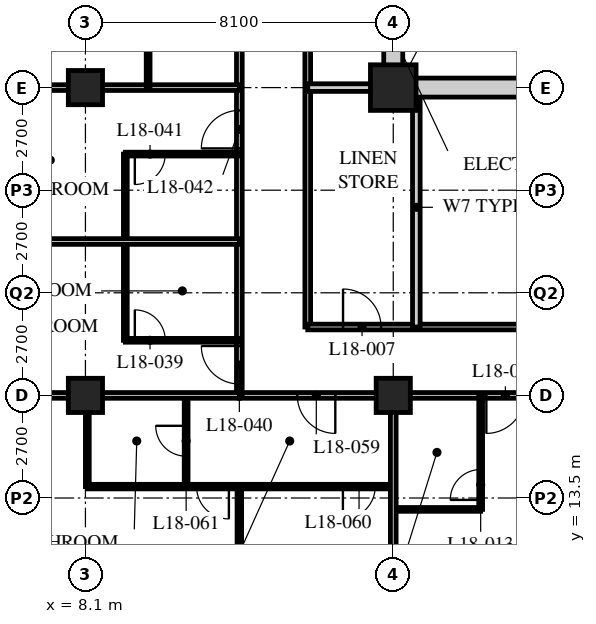
"""IFC4 building model, lengths in metres.
Left out: names, types, materials, properties, quantities, classifications, styles, units other than length and angle.
Written with IfcOpenShell. Run it as: python <this file> out.ifc"""

import sys

from ifc_helpers import new_model, si_unit, direction, frame, frame_2d, origin, origin_2d, place, context, subcontext, project, spatial, rectangle, hollow_rectangle, extrude, element, fill, save


model = new_model("IFC4")
c1 = context("Model", 3, precision=1e-05, world=origin(), true_north=direction((0.0, 1.0)))
c2 = subcontext(c1, "Body", "Model", "MODEL_VIEW")
j1 = project(units=[si_unit("LENGTHUNIT", "METRE"), si_unit("PLANEANGLEUNIT", "RADIAN")], contexts=[c1])
p1 = place(None, origin())
s1 = spatial("IfcSite", under=j1, at=p1, CompositionType="ELEMENT")
p2 = place(p1, origin())
s2 = spatial("IfcBuilding", under=s1, at=p2, CompositionType="ELEMENT")
p3 = place(p2, frame((0.0, 0.0, 73.8)))
s3 = spatial("IfcBuildingStorey", under=s2, at=p3, CompositionType="ELEMENT", Elevation=73.8)
for number, where, z_axis, x_axis in (
    (1, (8.1, 16.2, 0.0), (0.0, 0.0, 1.0), (1.0, 0.0, 0.0)),
    (2, (8.1, 24.3, 0.0), (0.0, 0.0, 1.0), (1.0, 0.0, 0.0)),
    (3, (16.2, 16.2, 0.0), (0.0, 0.0, 1.0), (1.0, 0.0, 0.0)),
):
    element("IfcColumn", number, at=place(p3, frame(where, z_axis=z_axis, x_axis=x_axis)), inside=s3, PredefinedType="COLUMN", context=c2, shape_type="SweptSolid", body=[
        extrude(hollow_rectangle(XDim=0.9, YDim=0.9, WallThickness=0.09, at=origin_2d()), origin(), (0.0, 0.0, 1.0), 3.4),
    ])
p4 = place(p3, frame((16.2, 24.3, 0.0), z_axis=(0.0, 0.0, 1.0), x_axis=(1.0, 0.0, 0.0)))
e4 = element("IfcColumn", 4, at=p4, inside=s3, PredefinedType="COLUMN", context=c2, shape_type="SweptSolid", body=[
    extrude(hollow_rectangle(XDim=1.2, YDim=1.2, WallThickness=0.12, at=origin_2d()), origin(), (0.0, 0.0, 1.0), 3.4),
])
p5 = place(p3, frame((12.15, 16.2, 0.0), z_axis=(0.0, 0.0, 1.0), x_axis=(1.0, 0.0, 0.0)))
e5 = element("IfcWall", 5, at=p5, inside=s3, PredefinedType="PARTITIONING", context=c2, shape_type="SweptSolid", body=[
    extrude(rectangle(XDim=36.45, YDim=0.15, at=frame_2d((18.225, 0.0))), origin(), (0.0, 0.0, 1.0), 2.578),
])
p6 = place(p5, frame((6.5, 0.0, 0.0)))
e6 = element("IfcOpeningElement", 6, at=p6, cuts=e5, PredefinedType="OPENING", context=c2, shape_type="SweptSolid", body=[
    extrude(rectangle(XDim=1.0, YDim=2.1, at=frame_2d((0.5, 1.05))), frame((0.0, 0.085, 0.0), z_axis=(0.0, -1.0, 0.0), x_axis=(1.0, 0.0, 0.0)), (0.0, 0.0, 1.0), 0.17),
])
p7 = place(p5, frame((8.4, 0.0, 0.0)))
e7 = element("IfcOpeningElement", 7, at=p7, cuts=e5, PredefinedType="OPENING", context=c2, shape_type="SweptSolid", body=[
    extrude(rectangle(XDim=1.0, YDim=2.1, at=frame_2d((0.5, 1.05))), frame((0.0, 0.085, 0.0), z_axis=(0.0, -1.0, 0.0), x_axis=(1.0, 0.0, 0.0)), (0.0, 0.0, 1.0), 0.17),
])
p8 = place(p5, frame((14.9, 0.0, 0.0)))
e8 = element("IfcOpeningElement", 8, at=p8, cuts=e5, PredefinedType="OPENING", context=c2, shape_type="SweptSolid", body=[
    extrude(rectangle(XDim=1.0, YDim=2.1, at=frame_2d((0.5, 1.05))), frame((0.0, 0.085, 0.0), z_axis=(0.0, -1.0, 0.0), x_axis=(1.0, 0.0, 0.0)), (0.0, 0.0, 1.0), 0.17),
])
p9 = place(p5, frame((16.5, 0.0, 0.0)))
e9 = element("IfcOpeningElement", 9, at=p9, cuts=e5, PredefinedType="OPENING", context=c2, shape_type="SweptSolid", body=[
    extrude(rectangle(XDim=1.0, YDim=2.1, at=frame_2d((0.5, 1.05))), frame((0.0, 0.085, 0.0), z_axis=(0.0, -1.0, 0.0), x_axis=(1.0, 0.0, 0.0)), (0.0, 0.0, 1.0), 0.17),
])
p10 = place(p5, frame((22.7, 0.0, 0.0)))
e10 = element("IfcOpeningElement", 10, at=p10, cuts=e5, PredefinedType="OPENING", context=c2, shape_type="SweptSolid", body=[
    extrude(rectangle(XDim=1.0, YDim=2.1, at=frame_2d((0.5, 1.05))), frame((0.0, 0.085, 0.0), z_axis=(0.0, -1.0, 0.0), x_axis=(1.0, 0.0, 0.0)), (0.0, 0.0, 1.0), 0.17),
])
p11 = place(p5, frame((24.9, 0.0, 0.0)))
e11 = element("IfcOpeningElement", 11, at=p11, cuts=e5, PredefinedType="OPENING", context=c2, shape_type="SweptSolid", body=[
    extrude(rectangle(XDim=1.0, YDim=2.1, at=frame_2d((0.5, 1.05))), frame((0.0, 0.085, 0.0), z_axis=(0.0, -1.0, 0.0), x_axis=(1.0, 0.0, 0.0)), (0.0, 0.0, 1.0), 0.17),
])
p12 = place(p5, frame((30.8, 0.0, 0.0)))
e12 = element("IfcOpeningElement", 12, at=p12, cuts=e5, PredefinedType="OPENING", context=c2, shape_type="SweptSolid", body=[
    extrude(rectangle(XDim=1.0, YDim=2.1, at=frame_2d((0.5, 1.05))), frame((0.0, 0.085, 0.0), z_axis=(0.0, -1.0, 0.0), x_axis=(1.0, 0.0, 0.0)), (0.0, 0.0, 1.0), 0.17),
])
p13 = place(p5, frame((1.525, 0.0, 0.0)))
e13 = element("IfcOpeningElement", 13, at=p13, cuts=e5, PredefinedType="OPENING", context=c2, shape_type="SweptSolid", body=[
    extrude(rectangle(XDim=1.0, YDim=2.1, at=frame_2d((0.5, 1.05))), frame((0.0, 0.085, 0.0), z_axis=(0.0, -1.0, 0.0), x_axis=(1.0, 0.0, 0.0)), (0.0, 0.0, 1.0), 0.17),
])
p14 = place(p5, frame((33.925, 0.0, 0.0)))
e14 = element("IfcOpeningElement", 14, at=p14, cuts=e5, PredefinedType="OPENING", context=c2, shape_type="SweptSolid", body=[
    extrude(rectangle(XDim=1.0, YDim=2.1, at=frame_2d((0.5, 1.05))), frame((0.0, 0.085, 0.0), z_axis=(0.0, -1.0, 0.0), x_axis=(1.0, 0.0, 0.0)), (0.0, 0.0, 1.0), 0.17),
])
p15 = place(p3, frame((12.15, 16.2, 0.0), z_axis=(0.0, 0.0, 1.0), x_axis=(0.0, 1.0, 0.0)))
e15 = element("IfcWall", 15, at=p15, inside=s3, PredefinedType="PARTITIONING", context=c2, shape_type="SweptSolid", body=[
    extrude(rectangle(XDim=26.1, YDim=0.15, at=frame_2d((13.05, 0.0))), origin(), (0.0, 0.0, 1.0), 3.19),
])
p16 = place(p15, frame((0.3, 0.0, 0.0)))
e16 = element("IfcOpeningElement", 16, at=p16, cuts=e15, PredefinedType="OPENING", context=c2, shape_type="SweptSolid", body=[
    extrude(rectangle(XDim=1.0, YDim=2.1, at=frame_2d((0.5, 1.05))), frame((0.0, 0.085, 0.0), z_axis=(0.0, -1.0, 0.0), x_axis=(1.0, 0.0, 0.0)), (0.0, 0.0, 1.0), 0.17),
])
p17 = place(p15, frame((6.5, 0.0, 0.0)))
e17 = element("IfcOpeningElement", 17, at=p17, cuts=e15, PredefinedType="OPENING", context=c2, shape_type="SweptSolid", body=[
    extrude(rectangle(XDim=1.0, YDim=2.1, at=frame_2d((0.5, 1.05))), frame((0.0, 0.085, 0.0), z_axis=(0.0, -1.0, 0.0), x_axis=(1.0, 0.0, 0.0)), (0.0, 0.0, 1.0), 0.17),
])
p18 = place(p15, frame((13.55, 0.0, 0.0)))
e18 = element("IfcOpeningElement", 18, at=p18, cuts=e15, PredefinedType="OPENING", context=c2, shape_type="SweptSolid", body=[
    extrude(rectangle(XDim=1.0, YDim=2.1, at=frame_2d((0.5, 1.05))), frame((0.0, 0.085, 0.0), z_axis=(0.0, -1.0, 0.0), x_axis=(1.0, 0.0, 0.0)), (0.0, 0.0, 1.0), 0.17),
])
p19 = place(p15, frame((21.65, 0.0, 0.0)))
e19 = element("IfcOpeningElement", 19, at=p19, cuts=e15, PredefinedType="OPENING", context=c2, shape_type="SweptSolid", body=[
    extrude(rectangle(XDim=1.0, YDim=2.1, at=frame_2d((0.5, 1.05))), frame((0.0, 0.085, 0.0), z_axis=(0.0, -1.0, 0.0), x_axis=(1.0, 0.0, 0.0)), (0.0, 0.0, 1.0), 0.17),
])
p20 = place(p3, frame((13.95, 40.5, 0.0), z_axis=(0.0, 0.0, 1.0), x_axis=(0.0, -1.0, 0.0)))
e20 = element("IfcWall", 20, at=p20, inside=s3, PredefinedType="PARTITIONING", context=c2, shape_type="SweptSolid", body=[
    extrude(rectangle(XDim=22.5, YDim=0.15, at=frame_2d((11.25, 0.0))), origin(), (0.0, 0.0, 1.0), 3.19),
])
p21 = place(p20, frame((11.65, 0.0, 0.0)))
e21 = element("IfcOpeningElement", 21, at=p21, cuts=e20, PredefinedType="OPENING", context=c2, shape_type="SweptSolid", body=[
    extrude(rectangle(XDim=1.0, YDim=2.1, at=frame_2d((0.5, 1.05))), frame((0.0, 0.085, 0.0), z_axis=(0.0, -1.0, 0.0), x_axis=(1.0, 0.0, 0.0)), (0.0, 0.0, 1.0), 0.17),
])
p22 = place(p20, frame((3.55, 0.0, 0.0)))
e22 = element("IfcOpeningElement", 22, at=p22, cuts=e20, PredefinedType="OPENING", context=c2, shape_type="SweptSolid", body=[
    extrude(rectangle(XDim=1.0, YDim=2.1, at=frame_2d((0.5, 1.05))), frame((0.0, 0.085, 0.0), z_axis=(0.0, -1.0, 0.0), x_axis=(1.0, 0.0, 0.0)), (0.0, 0.0, 1.0), 0.17),
])
p23 = place(p3, frame((13.95, 18.0, 0.0), z_axis=(0.0, 0.0, 1.0), x_axis=(1.0, 0.0, 0.0)))
e23 = element("IfcWall", 23, at=p23, inside=s3, PredefinedType="PARTITIONING", context=c2, shape_type="SweptSolid", body=[
    extrude(rectangle(XDim=13.19, YDim=0.15, at=frame_2d((6.595, 0.0))), origin(), (0.0, 0.0, 1.0), 3.19),
])
p24 = place(p23, frame((0.929, 0.0, 0.0)))
e24 = element("IfcOpeningElement", 24, at=p24, cuts=e23, PredefinedType="OPENING", context=c2, shape_type="SweptSolid", body=[
    extrude(rectangle(XDim=1.0, YDim=2.1, at=frame_2d((0.5, 1.05))), frame((0.0, 0.085, 0.0), z_axis=(0.0, -1.0, 0.0), x_axis=(1.0, 0.0, 0.0)), (0.0, 0.0, 1.0), 0.17),
])
p25 = place(p23, frame((7.529, 0.0, 0.0)))
e25 = element("IfcOpeningElement", 25, at=p25, cuts=e23, PredefinedType="OPENING", context=c2, shape_type="SweptSolid", body=[
    extrude(rectangle(XDim=1.0, YDim=2.1, at=frame_2d((0.5, 1.05))), frame((0.0, 0.085, 0.0), z_axis=(0.0, -1.0, 0.0), x_axis=(1.0, 0.0, 0.0)), (0.0, 0.0, 1.0), 0.17),
])
p26 = place(p3, frame((16.807, 18.0, 0.0), z_axis=(0.0, 0.0, 1.0), x_axis=(0.0, 1.0, 0.0)))
e26 = element("IfcWall", 26, at=p26, inside=s3, PredefinedType="SOLIDWALL", context=c2, shape_type="SweptSolid", body=[
    extrude(rectangle(XDim=6.3, YDim=0.2, at=frame_2d((3.15, 0.0))), origin(), (0.0, 0.0, 1.0), 3.19),
])
p27 = place(p3, frame((13.95, 24.3, 0.0), z_axis=(0.0, 0.0, 1.0), x_axis=(1.0, 0.0, 0.0)))
e27 = element("IfcWall", 27, at=p27, inside=s3, PredefinedType="SOLIDWALL", context=c2, shape_type="SweptSolid", body=[
    extrude(rectangle(XDim=2.25, YDim=0.2, at=frame_2d((1.125, 0.0))), origin(), (0.0, 0.0, 1.0), 2.578),
])
p28 = place(p3, frame((16.2, 13.2, 0.0), z_axis=(0.0, 0.0, 1.0), x_axis=(1.0, 0.0, 0.0)))
e28 = element("IfcWall", 28, at=p28, inside=s3, PredefinedType="PARTITIONING", context=c2, shape_type="SweptSolid", body=[
    extrude(rectangle(XDim=2.3, YDim=0.1, at=frame_2d((1.15, 0.0))), origin(), (0.0, 0.0, 1.0), 3.19),
])
p29 = place(p3, frame((18.5, 16.2, 0.0), z_axis=(0.0, 0.0, 1.0), x_axis=(0.0, -1.0, 0.0)))
e29 = element("IfcWall", 29, at=p29, inside=s3, PredefinedType="PARTITIONING", context=c2, shape_type="SweptSolid", body=[
    extrude(rectangle(XDim=3.0, YDim=0.1, at=frame_2d((1.5, 0.0))), origin(), (0.0, 0.0, 1.0), 3.19),
])
p30 = place(p29, frame((1.95, 0.0, 0.0)))
e30 = element("IfcOpeningElement", 30, at=p30, cuts=e29, PredefinedType="OPENING", context=c2, shape_type="SweptSolid", body=[
    extrude(rectangle(XDim=0.8, YDim=2.1, at=frame_2d((0.4, 1.05))), frame((0.0, 0.06, 0.0), z_axis=(0.0, -1.0, 0.0), x_axis=(1.0, 0.0, 0.0)), (0.0, 0.0, 1.0), 0.12),
])
p31 = place(p3, frame((9.15, 17.65, 0.0), z_axis=(0.0, 0.0, 1.0), x_axis=(0.0, 1.0, 0.0)))
e31 = element("IfcWall", 31, at=p31, inside=s3, PredefinedType="PARTITIONING", context=c2, shape_type="SweptSolid", body=[
    extrude(rectangle(XDim=4.9, YDim=0.1, at=frame_2d((2.45, 0.0))), origin(), (0.0, 0.0, 1.0), 3.19),
])
p32 = place(p3, frame((12.15, 17.65, 0.0), z_axis=(0.0, 0.0, 1.0), x_axis=(-1.0, 0.0, 0.0)))
e32 = element("IfcWall", 32, at=p32, inside=s3, PredefinedType="PARTITIONING", context=c2, shape_type="SweptSolid", body=[
    extrude(rectangle(XDim=3.0, YDim=0.1, at=frame_2d((1.5, 0.0))), origin(), (0.0, 0.0, 1.0), 3.19),
])
p33 = place(p32, frame((1.95, 0.0, 0.0)))
e33 = element("IfcOpeningElement", 33, at=p33, cuts=e32, PredefinedType="OPENING", context=c2, shape_type="SweptSolid", body=[
    extrude(rectangle(XDim=0.8, YDim=2.1, at=frame_2d((0.4, 1.05))), frame((0.0, 0.06, 0.0), z_axis=(0.0, -1.0, 0.0), x_axis=(1.0, 0.0, 0.0)), (0.0, 0.0, 1.0), 0.12),
])
p34 = place(p3, frame((12.15, 20.25, 0.0), z_axis=(0.0, 0.0, 1.0), x_axis=(-1.0, 0.0, 0.0)))
e34 = element("IfcWall", 34, at=p34, inside=s3, PredefinedType="PARTITIONING", context=c2, shape_type="SweptSolid", body=[
    extrude(rectangle(XDim=11.85, YDim=0.15, at=frame_2d((5.925, 0.0))), origin(), (0.0, 0.0, 1.0), 3.19),
])
p35 = place(p3, frame((12.15, 22.55, 0.0), z_axis=(0.0, 0.0, 1.0), x_axis=(-1.0, 0.0, 0.0)))
e35 = element("IfcWall", 35, at=p35, inside=s3, PredefinedType="PARTITIONING", context=c2, shape_type="SweptSolid", body=[
    extrude(rectangle(XDim=3.0, YDim=0.1, at=frame_2d((1.5, 0.0))), origin(), (0.0, 0.0, 1.0), 3.19),
])
p36 = place(p35, frame((1.95, 0.0, 0.0)))
e36 = element("IfcOpeningElement", 36, at=p36, cuts=e35, PredefinedType="OPENING", context=c2, shape_type="SweptSolid", body=[
    extrude(rectangle(XDim=0.8, YDim=2.1, at=frame_2d((0.4, 1.05))), frame((0.0, 0.06, 0.0), z_axis=(0.0, -1.0, 0.0), x_axis=(1.0, 0.0, 0.0)), (0.0, 0.0, 1.0), 0.12),
])
p37 = place(p3, frame((12.15, 24.3, 0.0), z_axis=(0.0, 0.0, 1.0), x_axis=(-1.0, 0.0, 0.0)))
e37 = element("IfcWall", 37, at=p37, inside=s3, PredefinedType="PARTITIONING", context=c2, shape_type="SweptSolid", body=[
    extrude(rectangle(XDim=11.85, YDim=0.15, at=frame_2d((5.925, 0.0))), origin(), (0.0, 0.0, 1.0), 2.578),
])
p38 = place(p3, frame((9.75, 24.3, 0.0), z_axis=(0.0, 0.0, 1.0), x_axis=(0.0, 1.0, 0.0)))
e38 = element("IfcWall", 38, at=p38, inside=s3, PredefinedType="PARTITIONING", context=c2, shape_type="SweptSolid", body=[
    extrude(rectangle(XDim=5.2, YDim=0.1, at=frame_2d((2.6, 0.0))), origin(), (0.0, 0.0, 1.0), 3.19),
])
p39 = place(p38, frame((1.3, 0.0, 0.0)))
e39 = element("IfcOpeningElement", 39, at=p39, cuts=e38, PredefinedType="OPENING", context=c2, shape_type="SweptSolid", body=[
    extrude(rectangle(XDim=0.8, YDim=2.1, at=frame_2d((0.4, 1.05))), frame((0.0, 0.06, 0.0), z_axis=(0.0, -1.0, 0.0), x_axis=(1.0, 0.0, 0.0)), (0.0, 0.0, 1.0), 0.12),
])
p40 = place(p38, frame((3.9, 0.0, 0.0)))
e40 = element("IfcOpeningElement", 40, at=p40, cuts=e38, PredefinedType="OPENING", context=c2, shape_type="SweptSolid", body=[
    extrude(rectangle(XDim=0.8, YDim=2.1, at=frame_2d((0.4, 1.05))), frame((0.0, 0.06, 0.0), z_axis=(0.0, -1.0, 0.0), x_axis=(1.0, 0.0, 0.0)), (0.0, 0.0, 1.0), 0.12),
])
p41 = place(p3, frame((10.75, 16.2, 0.0), z_axis=(0.0, 0.0, 1.0), x_axis=(0.0, -1.0, 0.0)))
e41 = element("IfcWall", 41, at=p41, inside=s3, PredefinedType="PARTITIONING", context=c2, shape_type="SweptSolid", body=[
    extrude(rectangle(XDim=2.4, YDim=0.1, at=frame_2d((1.2, 0.0))), origin(), (0.0, 0.0, 1.0), 3.19),
])
p42 = place(p41, frame((0.8, 0.0, 0.0)))
e42 = element("IfcOpeningElement", 42, at=p42, cuts=e41, PredefinedType="OPENING", context=c2, shape_type="SweptSolid", body=[
    extrude(rectangle(XDim=0.8, YDim=2.1, at=frame_2d((0.4, 1.05))), frame((0.0, 0.06, 0.0), z_axis=(0.0, -1.0, 0.0), x_axis=(1.0, 0.0, 0.0)), (0.0, 0.0, 1.0), 0.12),
])
p43 = place(p3, frame((8.15, 16.2, 0.0), z_axis=(0.0, 0.0, 1.0), x_axis=(0.0, -1.0, 0.0)))
e43 = element("IfcWall", 43, at=p43, inside=s3, PredefinedType="PARTITIONING", context=c2, shape_type="SweptSolid", body=[
    extrude(rectangle(XDim=2.4, YDim=0.1, at=frame_2d((1.2, 0.0))), origin(), (0.0, 0.0, 1.0), 2.578),
])
p44 = place(p3, frame((8.15, 13.8, 0.0), z_axis=(0.0, 0.0, 1.0), x_axis=(1.0, 0.0, 0.0)))
e44 = element("IfcWall", 44, at=p44, inside=s3, PredefinedType="PARTITIONING", context=c2, shape_type="SweptSolid", body=[
    extrude(rectangle(XDim=8.05, YDim=0.12, at=frame_2d((4.025, 0.0))), origin(), (0.0, 0.0, 1.0), 3.19),
])
p45 = place(p44, frame((6.725, 0.0, 0.0)))
e45 = element("IfcOpeningElement", 45, at=p45, cuts=e44, PredefinedType="OPENING", context=c2, shape_type="SweptSolid", body=[
    extrude(rectangle(XDim=0.85, YDim=2.1, at=frame_2d((0.425, 1.05))), frame((0.0, 0.07, 0.0), z_axis=(0.0, -1.0, 0.0), x_axis=(1.0, 0.0, 0.0)), (0.0, 0.0, 1.0), 0.14),
])
p46 = place(p44, frame((2.875, 0.0, 0.0)))
e46 = element("IfcOpeningElement", 46, at=p46, cuts=e44, PredefinedType="OPENING", context=c2, shape_type="SweptSolid", body=[
    extrude(rectangle(XDim=0.85, YDim=2.1, at=frame_2d((0.425, 1.05))), frame((0.0, 0.07, 0.0), z_axis=(0.0, -1.0, 0.0), x_axis=(1.0, 0.0, 0.0)), (0.0, 0.0, 1.0), 0.14),
])
p47 = place(p3, frame((12.15, 13.8, 0.0), z_axis=(0.0, 0.0, 1.0), x_axis=(0.0, -1.0, 0.0)))
e47 = element("IfcWall", 47, at=p47, inside=s3, PredefinedType="PARTITIONING", context=c2, shape_type="SweptSolid", body=[
    extrude(rectangle(XDim=13.5, YDim=0.12, at=frame_2d((6.75, 0.0))), origin(), (0.0, 0.0, 1.0), 3.19),
])
p48 = place(p3, frame((0.3, 16.2, 0.0), z_axis=(0.0, 0.0, 1.0), x_axis=(1.0, 0.0, 0.0)))
e48 = element("IfcWall", 48, at=p48, inside=s3, PredefinedType="PARTITIONING", context=c2, shape_type="SweptSolid", body=[
    extrude(rectangle(XDim=11.85, YDim=0.15, at=frame_2d((5.925, 0.0))), origin(), (0.0, 0.0, 1.0), 2.578),
])
p49 = place(p3, frame((16.2, 16.2, 0.0), z_axis=(0.0, 0.0, 1.0), x_axis=(0.0, -1.0, 0.0)))
e49 = element("IfcWall", 49, at=p49, inside=s3, PredefinedType="PARTITIONING", context=c2, shape_type="SweptSolid", body=[
    extrude(rectangle(XDim=15.9, YDim=0.15, at=frame_2d((7.95, 0.0))), origin(), (0.0, 0.0, 1.0), 2.578),
])
p50 = place(p3, frame((15.95, 24.3, 0.0), z_axis=(0.0, 0.0, 1.0), x_axis=(1.0, 0.0, 0.0)))
e50 = element("IfcWall", 50, at=p50, inside=s3, PredefinedType="SOLIDWALL", context=c2, shape_type="SweptSolid", body=[
    extrude(rectangle(XDim=24.8, YDim=0.5, at=frame_2d((12.4, 0.0))), origin(), (0.0, 0.0, 1.0), 2.54),
])
p51 = place(p50, frame((11.5, 0.0, 0.0)))
e51 = element("IfcOpeningElement", 51, at=p51, cuts=e50, PredefinedType="OPENING", context=c2, shape_type="SweptSolid", body=[
    extrude(rectangle(XDim=1.8, YDim=2.4, at=frame_2d((0.9, 1.2))), frame((0.0, 0.26, 0.0), z_axis=(0.0, -1.0, 0.0), x_axis=(1.0, 0.0, 0.0)), (0.0, 0.0, 1.0), 0.52),
])
p52 = place(p3, frame((16.2, 24.55, 0.0), z_axis=(0.0, 0.0, 1.0), x_axis=(0.0, 1.0, 0.0)))
e52 = element("IfcWall", 52, at=p52, inside=s3, PredefinedType="SOLIDWALL", context=c2, shape_type="SweptSolid", body=[
    extrude(rectangle(XDim=15.7, YDim=0.5, at=frame_2d((7.85, 0.0))), origin(), (0.0, 0.0, 1.0), 2.578),
])
p53 = place(p24, origin())
e53 = element("IfcDoor", 53, at=p53, inside=s3, OperationType="SINGLE_SWING_LEFT", PredefinedType="DOOR", context=c2, shape_type="SweptSolid", body=[
    extrude(rectangle(XDim=1.0, YDim=2.1, at=frame_2d((0.5, 1.05))), frame((0.0, 0.025, 0.0), z_axis=(0.0, -1.0, 0.0), x_axis=(1.0, 0.0, 0.0)), (0.0, 0.0, 1.0), 0.05),
])
fill(e24, e53)
p54 = place(p30, origin())
e54 = element("IfcDoor", 54, at=p54, inside=s3, OperationType="SINGLE_SWING_LEFT", PredefinedType="DOOR", context=c2, shape_type="SweptSolid", body=[
    extrude(rectangle(XDim=0.8, YDim=2.1, at=frame_2d((0.4, 1.05))), frame((0.0, 0.025, 0.0), z_axis=(0.0, -1.0, 0.0), x_axis=(1.0, 0.0, 0.0)), (0.0, 0.0, 1.0), 0.05),
])
fill(e30, e54)
p55 = place(p6, origin())
e55 = element("IfcDoor", 55, at=p55, inside=s3, OperationType="SINGLE_SWING_RIGHT", PredefinedType="DOOR", context=c2, shape_type="SweptSolid", body=[
    extrude(rectangle(XDim=1.0, YDim=2.1, at=frame_2d((0.5, 1.05))), frame((0.0, 0.025, 0.0), z_axis=(0.0, -1.0, 0.0), x_axis=(1.0, 0.0, 0.0)), (0.0, 0.0, 1.0), 0.05),
])
fill(e6, e55)
p56 = place(p33, origin())
e56 = element("IfcDoor", 56, at=p56, inside=s3, OperationType="SINGLE_SWING_LEFT", PredefinedType="DOOR", context=c2, shape_type="SweptSolid", body=[
    extrude(rectangle(XDim=0.8, YDim=2.1, at=frame_2d((0.4, 1.05))), frame((0.0, 0.025, 0.0), z_axis=(0.0, -1.0, 0.0), x_axis=(1.0, 0.0, 0.0)), (0.0, 0.0, 1.0), 0.05),
])
fill(e33, e56)
p57 = place(p16, origin())
e57 = element("IfcDoor", 57, at=p57, inside=s3, OperationType="SINGLE_SWING_RIGHT", PredefinedType="DOOR", context=c2, shape_type="SweptSolid", body=[
    extrude(rectangle(XDim=1.0, YDim=2.1, at=frame_2d((0.5, 1.05))), frame((0.0, 0.025, 0.0), z_axis=(0.0, -1.0, 0.0), x_axis=(1.0, 0.0, 0.0)), (0.0, 0.0, 1.0), 0.05),
])
fill(e16, e57)
p58 = place(p36, origin())
e58 = element("IfcDoor", 58, at=p58, inside=s3, OperationType="SINGLE_SWING_RIGHT", PredefinedType="DOOR", context=c2, shape_type="SweptSolid", body=[
    extrude(rectangle(XDim=0.8, YDim=2.1, at=frame_2d((0.4, 1.05))), frame((0.0, 0.025, 0.0), z_axis=(0.0, -1.0, 0.0), x_axis=(1.0, 0.0, 0.0)), (0.0, 0.0, 1.0), 0.05),
])
fill(e36, e58)
p59 = place(p17, origin())
e59 = element("IfcDoor", 59, at=p59, inside=s3, OperationType="SINGLE_SWING_LEFT", PredefinedType="DOOR", context=c2, shape_type="SweptSolid", body=[
    extrude(rectangle(XDim=1.0, YDim=2.1, at=frame_2d((0.5, 1.05))), frame((0.0, 0.025, 0.0), z_axis=(0.0, -1.0, 0.0), x_axis=(1.0, 0.0, 0.0)), (0.0, 0.0, 1.0), 0.05),
])
fill(e17, e59)
p60 = place(p13, origin())
e60 = element("IfcDoor", 60, at=p60, inside=s3, OperationType="SINGLE_SWING_LEFT", PredefinedType="DOOR", context=c2, shape_type="SweptSolid", body=[
    extrude(rectangle(XDim=1.0, YDim=2.1, at=frame_2d((0.5, 1.05))), frame((0.0, 0.025, 0.0), z_axis=(0.0, -1.0, 0.0), x_axis=(1.0, 0.0, 0.0)), (0.0, 0.0, 1.0), 0.05),
])
fill(e13, e60)
p61 = place(p45, origin())
e61 = element("IfcDoor", 61, at=p61, inside=s3, OperationType="SINGLE_SWING_RIGHT", PredefinedType="DOOR", context=c2, shape_type="SweptSolid", body=[
    extrude(rectangle(XDim=0.85, YDim=2.1, at=frame_2d((0.425, 1.05))), frame((0.0, 0.025, 0.0), z_axis=(0.0, -1.0, 0.0), x_axis=(1.0, 0.0, 0.0)), (0.0, 0.0, 1.0), 0.05),
])
fill(e45, e61)
p62 = place(p42, origin())
e62 = element("IfcDoor", 62, at=p62, inside=s3, OperationType="SINGLE_SWING_RIGHT", PredefinedType="DOOR", context=c2, shape_type="SweptSolid", body=[
    extrude(rectangle(XDim=0.8, YDim=2.1, at=frame_2d((0.4, 1.05))), frame((0.0, 0.025, 0.0), z_axis=(0.0, -1.0, 0.0), x_axis=(1.0, 0.0, 0.0)), (0.0, 0.0, 1.0), 0.05),
])
fill(e42, e62)
p63 = place(p46, origin())
e63 = element("IfcDoor", 63, at=p63, inside=s3, OperationType="SINGLE_SWING_LEFT", PredefinedType="DOOR", context=c2, shape_type="SweptSolid", body=[
    extrude(rectangle(XDim=0.85, YDim=2.1, at=frame_2d((0.425, 1.05))), frame((0.0, 0.025, 0.0), z_axis=(0.0, -1.0, 0.0), x_axis=(1.0, 0.0, 0.0)), (0.0, 0.0, 1.0), 0.05),
])
fill(e46, e63)
save(model, sys.argv[1])
